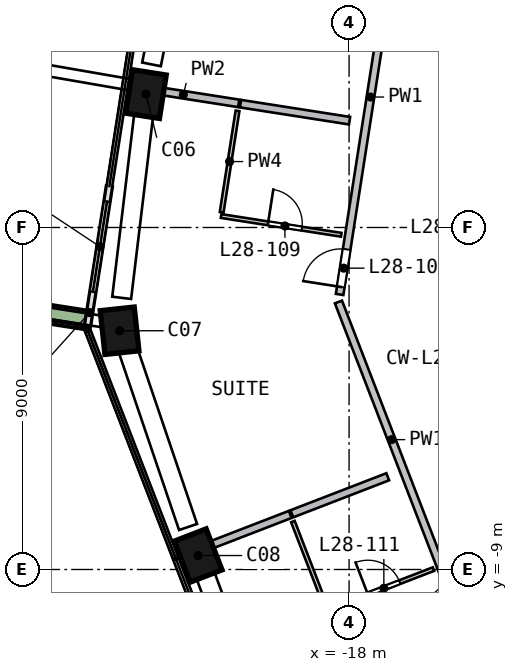
"""IFC4 building model, lengths in metres.
Left out: names, types, materials, properties, quantities, classifications, styles, units other than length and angle.
Written with IfcOpenShell. Run it as: python <this file> out.ifc"""

import sys

from ifc_helpers import new_model, si_unit, direction, frame, frame_2d, origin, origin_2d, place, context, subcontext, project, spatial, rectangle, extrude, element, fill, save


model = new_model("IFC4")
c1 = context("Model", 3, precision=1e-05, world=origin(), true_north=direction((0.0, 1.0)))
c2 = subcontext(c1, "Body", "Model", "MODEL_VIEW")
j1 = project(units=[si_unit("LENGTHUNIT", "METRE"), si_unit("PLANEANGLEUNIT", "RADIAN")], contexts=[c1])
p1 = place(None, origin())
s1 = spatial("IfcSite", under=j1, at=p1, CompositionType="ELEMENT")
p2 = place(p1, origin())
s2 = spatial("IfcBuilding", under=s1, at=p2, CompositionType="ELEMENT")
p3 = place(p2, frame((0.0, 0.0, 118.5)))
s3 = spatial("IfcBuildingStorey", under=s2, at=p3, CompositionType="ELEMENT", Elevation=118.5)
p4 = place(p3, frame((-23.325, 3.644, 0.0), z_axis=(-0.016415653, -0.111108905, 0.993672651), x_axis=(-0.153568339, -0.981734689, -0.112311022)))
e1 = element("IfcColumn", 1, at=p4, inside=s3, PredefinedType="COLUMN", context=c2, shape_type="SweptSolid", body=[
    extrude(rectangle(XDim=1.15, YDim=0.9, at=origin_2d()), origin(), (0.0, 0.0, 1.0), 3.019),
])
p5 = place(p3, frame((-24.055, -2.579, 0.0), z_axis=(0.013176869, -0.114307314, 0.993358046), x_axis=(-0.105374926, 0.987753651, 0.115060203)))
e2 = element("IfcColumn", 2, at=p5, inside=s3, PredefinedType="COLUMN", context=c2, shape_type="SweptSolid", body=[
    extrude(rectangle(XDim=1.15, YDim=0.9, at=origin_2d()), origin(), (0.0, 0.0, 1.0), 3.02),
])
p6 = place(p3, frame((-22.022, -8.507, 0.0), z_axis=(0.041321986, -0.104477507, 0.993668428), x_axis=(0.357606883, -0.927089617, -0.112348381)))
e3 = element("IfcColumn", 3, at=p6, inside=s3, PredefinedType="COLUMN", context=c2, shape_type="SweptSolid", body=[
    extrude(rectangle(XDim=1.15, YDim=0.9, at=origin_2d()), origin(), (0.0, 0.0, 1.0), 3.019),
])
p7 = place(p3, frame((-24.309, 1.076, 0.0), z_axis=(0.0, 0.0, 1.0), x_axis=(-0.154370858, -0.988012975, 0.0)))
e4 = element("IfcWall", 4, at=p7, inside=s3, PredefinedType="SOLIDWALL", context=c2, shape_type="SweptSolid", body=[
    extrude(rectangle(XDim=3.71, YDim=0.15, at=frame_2d((1.855, 0.0))), origin(), (0.0, 0.0, 1.0), 2.935),
])
p8 = place(p7, frame((0.4, 0.0, 0.0)))
e5 = element("IfcOpeningElement", 5, at=p8, cuts=e4, PredefinedType="OPENING", context=c2, shape_type="SweptSolid", body=[
    extrude(rectangle(XDim=2.4, YDim=2.4, at=frame_2d((1.2, 1.2))), frame((0.0, 0.085, 0.0), z_axis=(0.0, -1.0, 0.0), x_axis=(1.0, 0.0, 0.0)), (0.0, 0.0, 1.0), 0.17),
])
p9 = place(p3, frame((-25.767, 11.337, 0.0), z_axis=(0.0, 0.0, 1.0), x_axis=(-0.15436277, -0.988014238, 0.0)))
e6 = element("IfcWall", 6, at=p9, inside=s3, PredefinedType="SOLIDWALL", context=c2, shape_type="SweptSolid", body=[
    extrude(rectangle(XDim=13.724, YDim=0.5, at=frame_2d((6.862, 0.0))), origin(), (0.0, 0.0, 1.0), 0.7),
])
p10 = place(p3, frame((-27.6, -2.014, 0.0), z_axis=(0.0, 0.0, 1.0), x_axis=(0.988021948, -0.154313416, 0.0)))
e7 = element("IfcWall", 7, at=p10, inside=s3, PredefinedType="SOLIDWALL", context=c2, shape_type="SweptSolid", body=[
    extrude(rectangle(XDim=2.699, YDim=0.5, at=frame_2d((1.35, 0.0))), origin(), (0.0, 0.0, 1.0), 0.7),
])
p11 = place(p3, frame((-18.249, -1.762, 0.0), z_axis=(0.0, 0.0, 1.0), x_axis=(0.154375246, 0.988012289, 0.0)))
e8 = element("IfcWall", 8, at=p11, inside=s3, PredefinedType="SOLIDWALL", context=c2, shape_type="SweptSolid", body=[
    extrude(rectangle(XDim=9.116, YDim=0.2, at=frame_2d((4.558, 0.0))), origin(), (0.0, 0.0, 1.0), 3.0),
])
p12 = place(p11, frame((0.2, 0.0, 0.0)))
e9 = element("IfcOpeningElement", 9, at=p12, cuts=e8, PredefinedType="OPENING", context=c2, shape_type="SweptSolid", body=[
    extrude(rectangle(XDim=1.0, YDim=2.1, at=frame_2d((0.5, 1.05))), frame((0.0, 0.11, 0.0), z_axis=(0.0, -1.0, 0.0), x_axis=(1.0, 0.0, 0.0)), (0.0, 0.0, 1.0), 0.22),
])
p13 = place(p3, frame((-14.851, -10.837, 0.0), z_axis=(0.0, 0.0, 1.0), x_axis=(-0.360328251, 0.932825574, 0.0)))
e10 = element("IfcWall", 10, at=p13, inside=s3, PredefinedType="SOLIDWALL", context=c2, shape_type="SweptSolid", body=[
    extrude(rectangle(XDim=9.516, YDim=0.2, at=frame_2d((4.758, 0.0))), origin(), (0.0, 0.0, 1.0), 3.0),
])
p14 = place(p13, frame((0.55, 0.0, 0.0)))
e11 = element("IfcOpeningElement", 11, at=p14, cuts=e10, PredefinedType="OPENING", context=c2, shape_type="SweptSolid", body=[
    extrude(rectangle(XDim=1.0, YDim=2.1, at=frame_2d((0.5, 1.05))), frame((0.0, 0.11, 0.0), z_axis=(0.0, -1.0, 0.0), x_axis=(1.0, 0.0, 0.0)), (0.0, 0.0, 1.0), 0.22),
])
p15 = place(p3, frame((-20.903, 3.266, 0.0), z_axis=(0.0, 0.0, 1.0), x_axis=(-0.988021098, 0.154318856, 0.0)))
e12 = element("IfcWall", 12, at=p15, inside=s3, PredefinedType="SOLIDWALL", context=c2, shape_type="SweptSolid", body=[
    extrude(rectangle(XDim=2.952, YDim=0.2, at=frame_2d((1.476, 0.0))), origin(), (0.0, 0.0, 1.0), 3.0),
])
p16 = place(p3, frame((-19.549, -7.551, 0.0), z_axis=(0.0, 0.0, 1.0), x_axis=(-0.932833636, -0.360307379, 0.0)))
e13 = element("IfcWall", 13, at=p16, inside=s3, PredefinedType="SOLIDWALL", context=c2, shape_type="SweptSolid", body=[
    extrude(rectangle(XDim=3.152, YDim=0.2, at=frame_2d((1.576, 0.0))), origin(), (0.0, 0.0, 1.0), 3.0),
])
p17 = place(p3, frame((-17.987, 2.81, 0.0), z_axis=(0.0, 0.0, 1.0), x_axis=(-0.988010431, 0.154387135, 0.0)))
e14 = element("IfcWall", 14, at=p17, inside=s3, PredefinedType="SOLIDWALL", context=c2, shape_type="SweptSolid", body=[
    extrude(rectangle(XDim=2.905, YDim=0.2, at=frame_2d((1.453, 0.0))), origin(), (0.0, 0.0, 1.0), 3.0),
])
p18 = place(p3, frame((-16.983, -6.56, 0.0), z_axis=(0.0, 0.0, 1.0), x_axis=(-0.932818823, -0.360345727, 0.0)))
e15 = element("IfcWall", 15, at=p18, inside=s3, PredefinedType="SOLIDWALL", context=c2, shape_type="SweptSolid", body=[
    extrude(rectangle(XDim=2.705, YDim=0.2, at=frame_2d((1.352, 0.0))), origin(), (0.0, 0.0, 1.0), 3.0),
])
p19 = place(p3, frame((-21.352, 0.401, 0.0), z_axis=(0.0, 0.0, 1.0), x_axis=(0.154346539, 0.988016774, 0.0)))
e16 = element("IfcWall", 16, at=p19, inside=s3, PredefinedType="PARTITIONING", context=c2, shape_type="SweptSolid", body=[
    extrude(rectangle(XDim=2.7, YDim=0.1, at=frame_2d((1.35, 0.0))), origin(), (0.0, 0.0, 1.0), 3.0),
])
p20 = place(p3, frame((-21.368, 0.302, 0.0), z_axis=(0.0, 0.0, 1.0), x_axis=(0.988017124, -0.154344297, 0.0)))
e17 = element("IfcWall", 17, at=p20, inside=s3, PredefinedType="PARTITIONING", context=c2, shape_type="SweptSolid", body=[
    extrude(rectangle(XDim=3.2, YDim=0.1, at=frame_2d((1.6, 0.0))), origin(), (0.0, 0.0, 1.0), 3.0),
])
p21 = place(p20, frame((1.25, 0.0, 0.0)))
e18 = element("IfcOpeningElement", 18, at=p21, cuts=e17, PredefinedType="OPENING", context=c2, shape_type="SweptSolid", body=[
    extrude(rectangle(XDim=0.9, YDim=2.1, at=frame_2d((0.45, 1.05))), frame((0.0, 0.06, 0.0), z_axis=(0.0, -1.0, 0.0), x_axis=(1.0, 0.0, 0.0)), (0.0, 0.0, 1.0), 0.12),
])
p22 = place(p3, frame((-18.614, -9.977, 0.0), z_axis=(0.0, 0.0, 1.0), x_axis=(-0.360314788, 0.932830774, 0.0)))
e19 = element("IfcWall", 19, at=p22, inside=s3, PredefinedType="PARTITIONING", context=c2, shape_type="SweptSolid", body=[
    extrude(rectangle(XDim=2.4, YDim=0.1, at=frame_2d((1.2, 0.0))), origin(), (0.0, 0.0, 1.0), 3.0),
])
p23 = place(p3, frame((-18.578, -10.07, 0.0), z_axis=(0.0, 0.0, 1.0), x_axis=(0.932839169, 0.360293055, 0.0)))
e20 = element("IfcWall", 20, at=p23, inside=s3, PredefinedType="PARTITIONING", context=c2, shape_type="SweptSolid", body=[
    extrude(rectangle(XDim=3.0, YDim=0.1, at=frame_2d((1.5, 0.0))), origin(), (0.0, 0.0, 1.0), 3.0),
])
p24 = place(p23, frame((1.15, 0.0, 0.0)))
e21 = element("IfcOpeningElement", 21, at=p24, cuts=e20, PredefinedType="OPENING", context=c2, shape_type="SweptSolid", body=[
    extrude(rectangle(XDim=0.9, YDim=2.1, at=frame_2d((0.45, 1.05))), frame((0.0, 0.06, 0.0), z_axis=(0.0, -1.0, 0.0), x_axis=(1.0, 0.0, 0.0)), (0.0, 0.0, 1.0), 0.12),
])
p25 = place(p8, origin())
e22 = element("IfcDoor", 22, at=p25, inside=s3, OperationType="SLIDING_TO_RIGHT", PredefinedType="DOOR", context=c2, shape_type="SweptSolid", body=[
    extrude(rectangle(XDim=2.4, YDim=2.4, at=frame_2d((1.2, 1.2))), frame((0.0, 0.025, 0.0), z_axis=(0.0, -1.0, 0.0), x_axis=(1.0, 0.0, 0.0)), (0.0, 0.0, 1.0), 0.05),
])
fill(e5, e22)
p26 = place(p12, origin())
e23 = element("IfcDoor", 23, at=p26, inside=s3, OperationType="SINGLE_SWING_LEFT", PredefinedType="DOOR", context=c2, shape_type="SweptSolid", body=[
    extrude(rectangle(XDim=1.0, YDim=2.1, at=frame_2d((0.5, 1.05))), frame((0.0, 0.025, 0.0), z_axis=(0.0, -1.0, 0.0), x_axis=(1.0, 0.0, 0.0)), (0.0, 0.0, 1.0), 0.05),
])
fill(e9, e23)
p27 = place(p21, origin())
e24 = element("IfcDoor", 24, at=p27, inside=s3, OperationType="SINGLE_SWING_LEFT", PredefinedType="DOOR", context=c2, shape_type="SweptSolid", body=[
    extrude(rectangle(XDim=0.9, YDim=2.1, at=frame_2d((0.45, 1.05))), frame((0.0, 0.025, 0.0), z_axis=(0.0, -1.0, 0.0), x_axis=(1.0, 0.0, 0.0)), (0.0, 0.0, 1.0), 0.05),
])
fill(e18, e24)
p28 = place(p24, origin())
e25 = element("IfcDoor", 25, at=p28, inside=s3, OperationType="SINGLE_SWING_LEFT", PredefinedType="DOOR", context=c2, shape_type="SweptSolid", body=[
    extrude(rectangle(XDim=0.9, YDim=2.1, at=frame_2d((0.45, 1.05))), frame((0.0, 0.025, 0.0), z_axis=(0.0, -1.0, 0.0), x_axis=(1.0, 0.0, 0.0)), (0.0, 0.0, 1.0), 0.05),
])
fill(e21, e25)
save(model, sys.argv[1])
